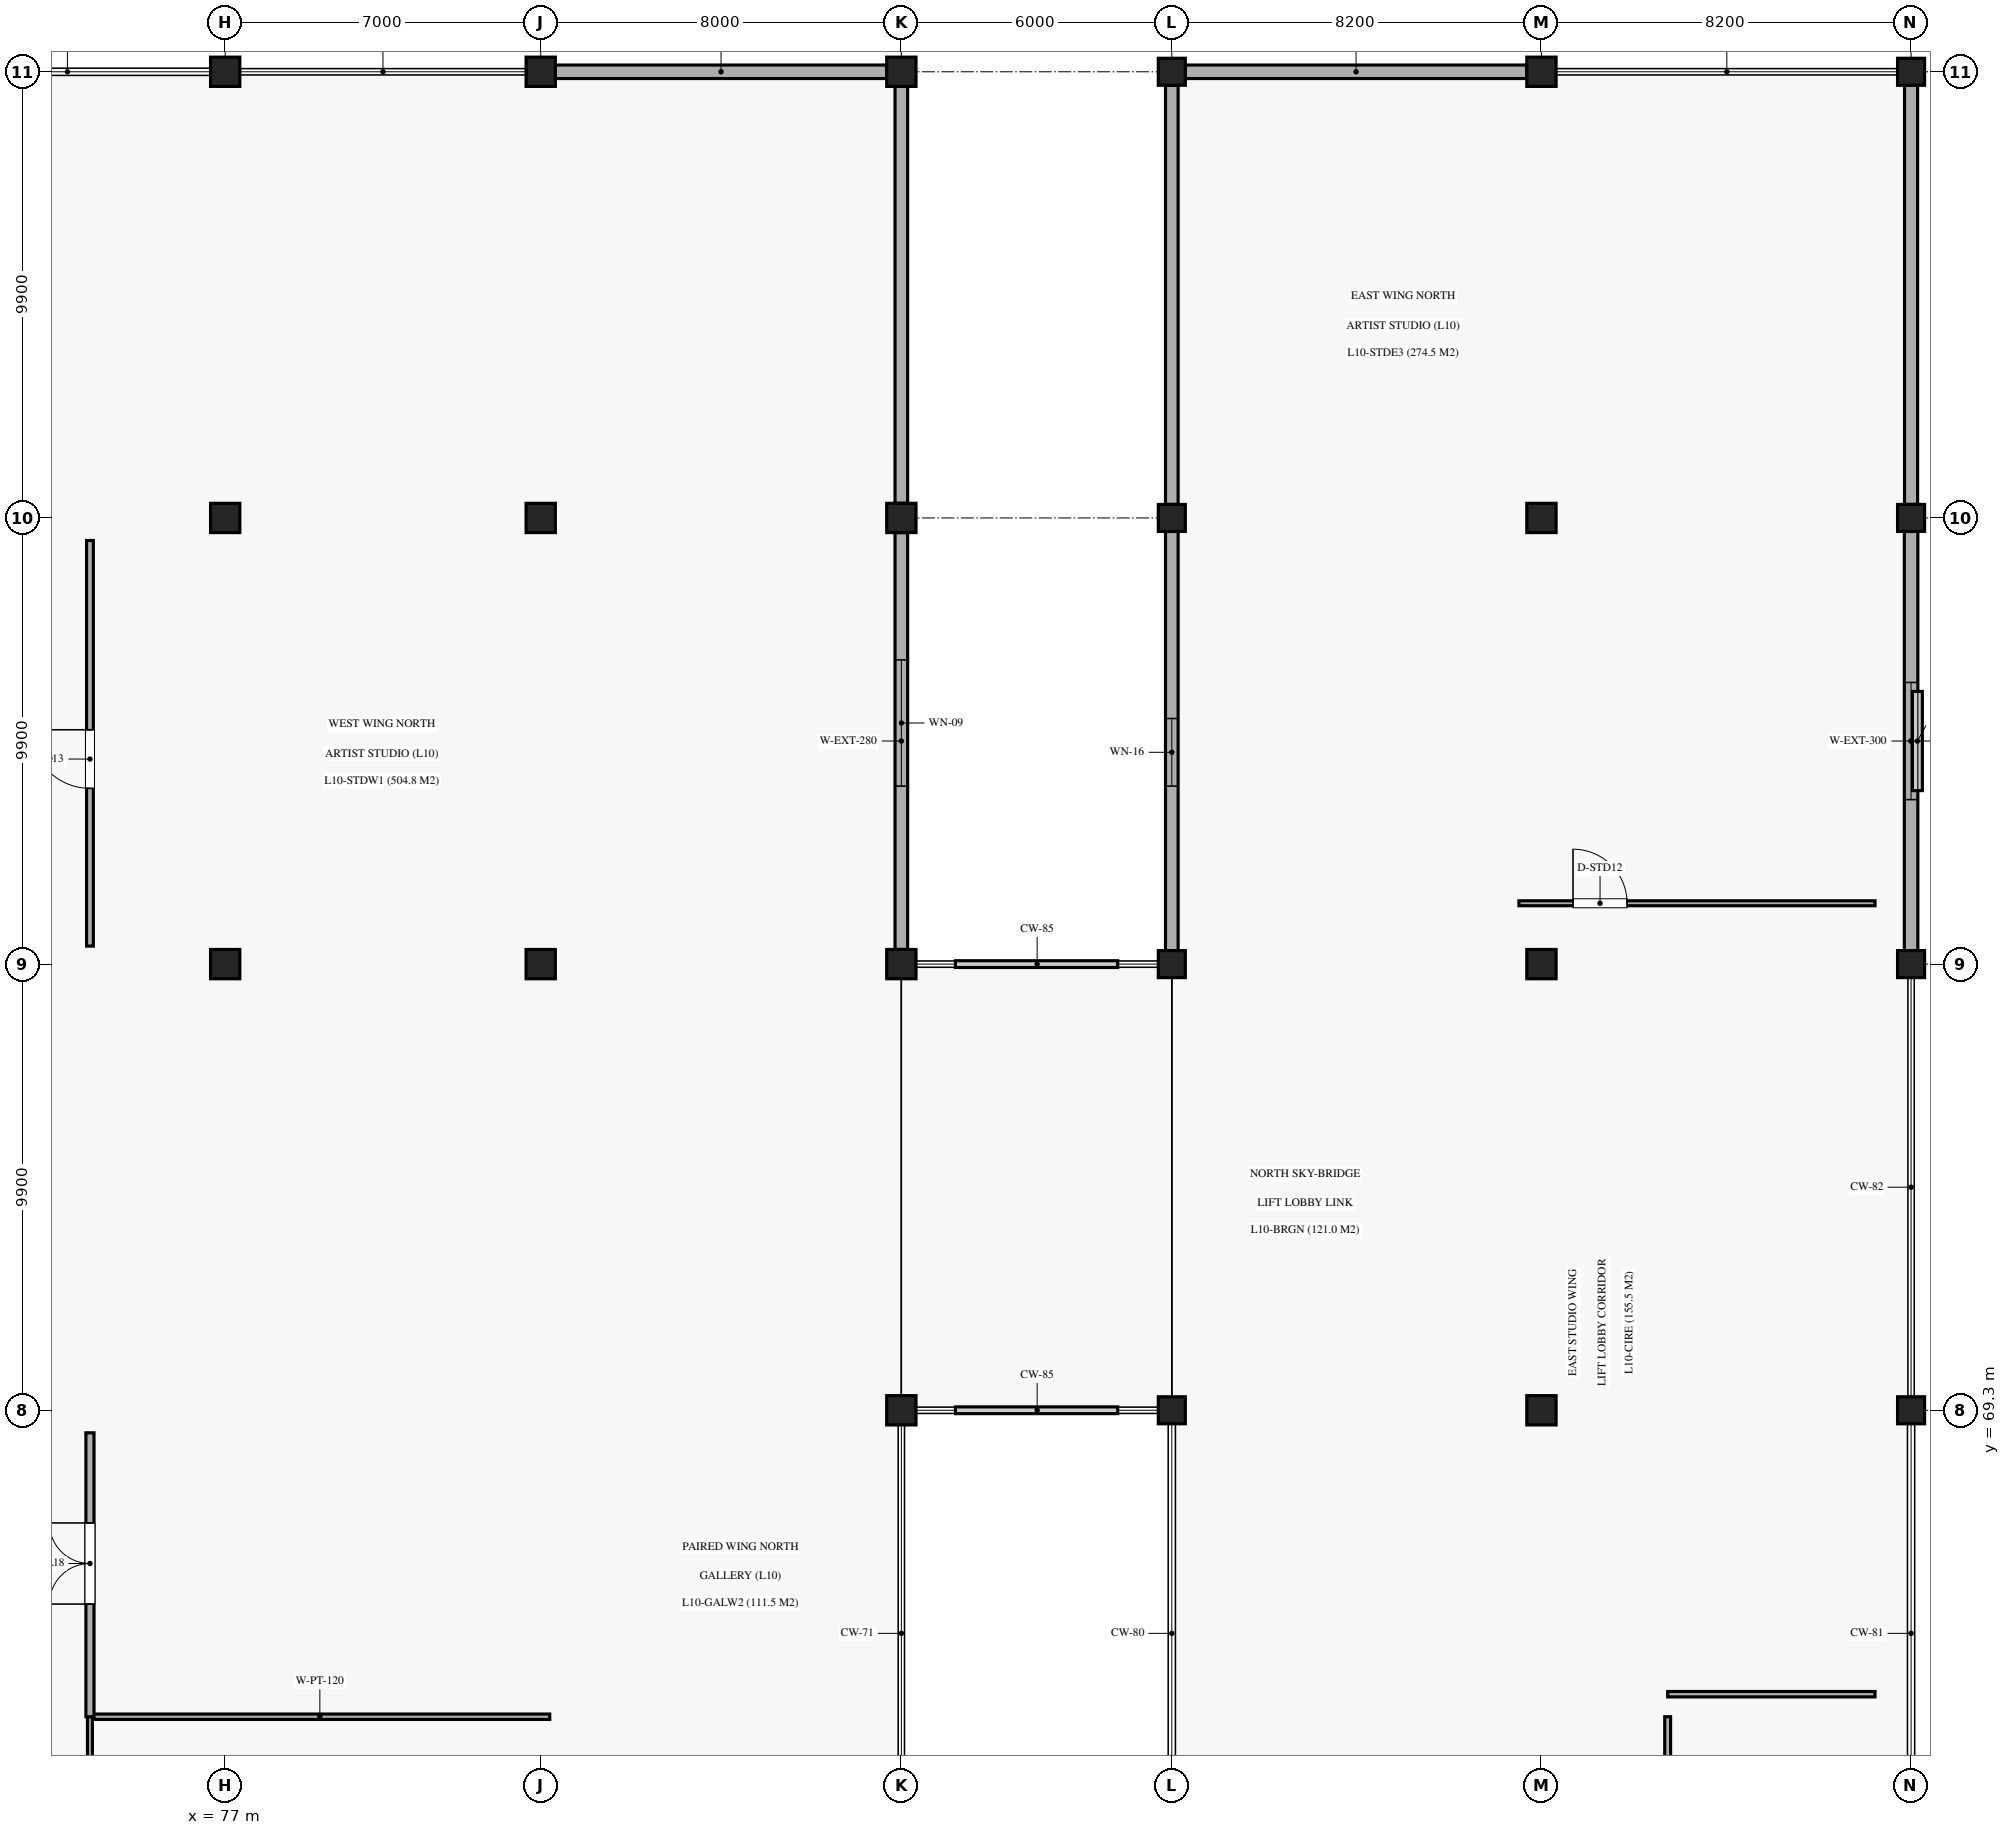
"""IFC4 building model, lengths in metres.
Left out: names, types, materials, properties, quantities, classifications, styles, units other than length and angle.
Written with IfcOpenShell. Run it as: python <this file> out.ifc"""

import sys

from ifc_helpers import new_model, si_unit, direction, frame, frame_2d, origin, origin_2d, place, context, subcontext, project, spatial, rectangle, extrude, element, fill, save


model = new_model("IFC4")
c1 = context("Model", 3, precision=1e-05, world=origin(), true_north=direction((0.0, 1.0)))
c2 = subcontext(c1, "Body", "Model", "MODEL_VIEW")
j1 = project(units=[si_unit("LENGTHUNIT", "METRE"), si_unit("PLANEANGLEUNIT", "RADIAN")], contexts=[c1])
p1 = place(None, origin())
s1 = spatial("IfcSite", under=j1, at=p1, CompositionType="ELEMENT")
p2 = place(p1, origin())
s2 = spatial("IfcBuilding", under=s1, at=p2, CompositionType="ELEMENT")
p3 = place(p2, frame((0.0, 0.0, 52.02)))
s3 = spatial("IfcBuildingStorey", under=s2, at=p3, CompositionType="ELEMENT", Elevation=52.02)
for number, where, z_axis, x_axis in (
    (1, (77.0, 79.2, 0.0), (0.0, 0.0, 1.0), (1.0, 0.0, 0.0)),
    (2, (77.0, 89.1, 0.0), (0.0, 0.0, 1.0), (1.0, 0.0, 0.0)),
    (3, (77.0, 99.0, 0.0), (0.0, 0.0, 1.0), (1.0, 0.0, 0.0)),
    (4, (84.0, 79.2, 0.0), (0.0, 0.0, 1.0), (1.0, 0.0, 0.0)),
    (5, (84.0, 89.1, 0.0), (0.0, 0.0, 1.0), (1.0, 0.0, 0.0)),
    (6, (84.0, 99.0, 0.0), (0.0, 0.0, 1.0), (1.0, 0.0, 0.0)),
    (7, (92.0, 69.3, 0.0), (0.0, 0.0, 1.0), (1.0, 0.0, 0.0)),
    (8, (92.0, 79.2, 0.0), (0.0, 0.0, 1.0), (1.0, 0.0, 0.0)),
    (9, (92.0, 89.1, 0.0), (0.0, 0.0, 1.0), (1.0, 0.0, 0.0)),
    (10, (92.0, 99.0, 0.0), (0.0, 0.0, 1.0), (1.0, 0.0, 0.0)),
):
    element("IfcColumn", number, at=place(p3, frame(where, z_axis=z_axis, x_axis=x_axis)), inside=s3, PredefinedType="COLUMN", context=c2, shape_type="SweptSolid", body=[
        extrude(rectangle(XDim=0.65, YDim=0.65, at=origin_2d()), origin(), (0.0, 0.0, 1.0), 5.1),
    ])
for number, where, z_axis, x_axis in (
    (11, (98.0, 69.3, 0.0), (0.0, 0.0, 1.0), (1.0, 0.0, 0.0)),
    (12, (98.0, 79.2, 0.0), (0.0, 0.0, 1.0), (1.0, 0.0, 0.0)),
    (13, (98.0, 89.1, 0.0), (0.0, 0.0, 1.0), (1.0, 0.0, 0.0)),
    (14, (98.0, 99.0, 0.0), (0.0, 0.0, 1.0), (1.0, 0.0, 0.0)),
):
    element("IfcColumn", number, at=place(p3, frame(where, z_axis=z_axis, x_axis=x_axis)), inside=s3, PredefinedType="COLUMN", context=c2, shape_type="SweptSolid", body=[
        extrude(rectangle(XDim=0.6, YDim=0.6, at=origin_2d()), origin(), (0.0, 0.0, 1.0), 5.1),
    ])
for number, where, z_axis, x_axis in (
    (15, (106.2, 69.3, 0.0), (0.0, 0.0, 1.0), (1.0, 0.0, 0.0)),
    (16, (106.2, 79.2, 0.0), (0.0, 0.0, 1.0), (1.0, 0.0, 0.0)),
    (17, (106.2, 89.1, 0.0), (0.0, 0.0, 1.0), (1.0, 0.0, 0.0)),
    (18, (106.2, 99.0, 0.0), (0.0, 0.0, 1.0), (1.0, 0.0, 0.0)),
):
    element("IfcColumn", number, at=place(p3, frame(where, z_axis=z_axis, x_axis=x_axis)), inside=s3, PredefinedType="COLUMN", context=c2, shape_type="SweptSolid", body=[
        extrude(rectangle(XDim=0.65, YDim=0.65, at=origin_2d()), origin(), (0.0, 0.0, 1.0), 5.1),
    ])
for number, where, z_axis, x_axis in (
    (19, (114.4, 69.3, 0.0), (0.0, 0.0, 1.0), (1.0, 0.0, 0.0)),
    (20, (114.4, 79.2, 0.0), (0.0, 0.0, 1.0), (1.0, 0.0, 0.0)),
    (21, (114.4, 89.1, 0.0), (0.0, 0.0, 1.0), (1.0, 0.0, 0.0)),
    (22, (114.4, 99.0, 0.0), (0.0, 0.0, 1.0), (1.0, 0.0, 0.0)),
):
    element("IfcColumn", number, at=place(p3, frame(where, z_axis=z_axis, x_axis=x_axis)), inside=s3, PredefinedType="COLUMN", context=c2, shape_type="SweptSolid", body=[
        extrude(rectangle(XDim=0.6, YDim=0.6, at=origin_2d()), origin(), (0.0, 0.0, 1.0), 5.1),
    ])
p4 = place(p3, frame((92.0, 79.525, 0.0), z_axis=(0.0, 0.0, 1.0), x_axis=(0.0, 1.0, 0.0)))
e23 = element("IfcWall", 23, at=p4, inside=s3, PredefinedType="SOLIDWALL", context=c2, shape_type="SweptSolid", body=[
    extrude(rectangle(XDim=9.25, YDim=0.28, at=frame_2d((4.625, 0.0))), origin(), (0.0, 0.0, 1.0), 4.1),
])
p5 = place(p4, frame((3.625, 0.0, 1.45)))
e24 = element("IfcOpeningElement", 24, at=p5, cuts=e23, PredefinedType="OPENING", context=c2, shape_type="SweptSolid", body=[
    extrude(rectangle(XDim=2.8, YDim=1.9, at=frame_2d((1.4, 0.95))), frame((0.0, 0.15, 0.0), z_axis=(0.0, -1.0, 0.0), x_axis=(1.0, 0.0, 0.0)), (0.0, 0.0, 1.0), 0.3),
])
p6 = place(p3, frame((92.0, 89.425, 0.0), z_axis=(0.0, 0.0, 1.0), x_axis=(0.0, 1.0, 0.0)))
e25 = element("IfcWall", 25, at=p6, inside=s3, PredefinedType="SOLIDWALL", context=c2, shape_type="SweptSolid", body=[
    extrude(rectangle(XDim=9.25, YDim=0.28, at=frame_2d((4.625, 0.0))), origin(), (0.0, 0.0, 1.0), 4.1),
])
p7 = place(p3, frame((84.325, 99.0, 0.0), z_axis=(0.0, 0.0, 1.0), x_axis=(1.0, 0.0, 0.0)))
e26 = element("IfcWall", 26, at=p7, inside=s3, PredefinedType="SOLIDWALL", context=c2, shape_type="SweptSolid", body=[
    extrude(rectangle(XDim=7.35, YDim=0.3, at=frame_2d((3.675, 0.0))), origin(), (0.0, 0.0, 1.0), 4.1),
])
p8 = place(p3, frame((98.0, 79.5, 0.0), z_axis=(0.0, 0.0, 1.0), x_axis=(0.0, 1.0, 0.0)))
e27 = element("IfcWall", 27, at=p8, inside=s3, PredefinedType="SOLIDWALL", context=c2, shape_type="SweptSolid", body=[
    extrude(rectangle(XDim=9.3, YDim=0.28, at=frame_2d((4.65, 0.0))), origin(), (0.0, 0.0, 1.0), 4.1),
])
p9 = place(p8, frame((3.65, 0.0, 1.45)))
e28 = element("IfcOpeningElement", 28, at=p9, cuts=e27, PredefinedType="OPENING", context=c2, shape_type="SweptSolid", body=[
    extrude(rectangle(XDim=1.5, YDim=1.35, at=frame_2d((0.75, 0.675))), frame((0.0, 0.15, 0.0), z_axis=(0.0, -1.0, 0.0), x_axis=(1.0, 0.0, 0.0)), (0.0, 0.0, 1.0), 0.3),
])
p10 = place(p3, frame((114.4, 79.5, 0.0), z_axis=(0.0, 0.0, 1.0), x_axis=(0.0, 1.0, 0.0)))
e29 = element("IfcWall", 29, at=p10, inside=s3, PredefinedType="SOLIDWALL", context=c2, shape_type="SweptSolid", body=[
    extrude(rectangle(XDim=9.3, YDim=0.3, at=frame_2d((4.65, 0.0))), origin(), (0.0, 0.0, 1.0), 4.1),
])
p11 = place(p10, frame((3.35, 0.0, 1.65)))
e30 = element("IfcOpeningElement", 30, at=p11, cuts=e29, PredefinedType="OPENING", context=c2, shape_type="SweptSolid", body=[
    extrude(rectangle(XDim=2.6, YDim=1.85, at=frame_2d((1.3, 0.925))), frame((0.0, 0.16, 0.0), z_axis=(0.0, -1.0, 0.0), x_axis=(1.0, 0.0, 0.0)), (0.0, 0.0, 1.0), 0.32),
])
p12 = place(p3, frame((98.0, 89.4, 0.0), z_axis=(0.0, 0.0, 1.0), x_axis=(0.0, 1.0, 0.0)))
e31 = element("IfcWall", 31, at=p12, inside=s3, PredefinedType="SOLIDWALL", context=c2, shape_type="SweptSolid", body=[
    extrude(rectangle(XDim=9.3, YDim=0.28, at=frame_2d((4.65, 0.0))), origin(), (0.0, 0.0, 1.0), 4.1),
])
p13 = place(p3, frame((114.4, 89.4, 0.0), z_axis=(0.0, 0.0, 1.0), x_axis=(0.0, 1.0, 0.0)))
e32 = element("IfcWall", 32, at=p13, inside=s3, PredefinedType="SOLIDWALL", context=c2, shape_type="SweptSolid", body=[
    extrude(rectangle(XDim=9.3, YDim=0.29, at=frame_2d((4.65, 0.0))), origin(), (0.0, 0.0, 1.0), 4.1),
])
p14 = place(p3, frame((98.3, 99.0, 0.0), z_axis=(0.0, 0.0, 1.0), x_axis=(1.0, 0.0, 0.0)))
e33 = element("IfcWall", 33, at=p14, inside=s3, PredefinedType="SOLIDWALL", context=c2, shape_type="SweptSolid", body=[
    extrude(rectangle(XDim=7.575, YDim=0.3, at=frame_2d((3.788, 0.0))), origin(), (0.0, 0.0, 1.0), 4.1),
])
p15 = place(p3, frame((74.0, 62.5, 0.0), z_axis=(0.0, 0.0, 1.0), x_axis=(1.0, 0.0, 0.0)))
e34 = element("IfcWall", 34, at=p15, inside=s3, PredefinedType="PARTITIONING", context=c2, shape_type="SweptSolid", body=[
    extrude(rectangle(XDim=10.2, YDim=0.12, at=frame_2d((5.1, 0.0))), origin(), (0.0, 0.0, 1.0), 3.97),
])
p16 = place(p3, frame((74.0, 40.2, 0.0), z_axis=(0.0, 0.0, 1.0), x_axis=(0.0, 1.0, 0.0)))
e35 = element("IfcWall", 35, at=p16, inside=s3, PredefinedType="PARTITIONING", context=c2, shape_type="SweptSolid", body=[
    extrude(rectangle(XDim=22.3, YDim=0.11, at=frame_2d((11.15, 0.0))), origin(), (0.0, 0.0, 1.0), 3.97),
])
p17 = place(p16, frame((3.2, 0.0, 0.0)))
e36 = element("IfcOpeningElement", 36, at=p17, cuts=e35, PredefinedType="OPENING", context=c2, shape_type="SweptSolid", body=[
    extrude(rectangle(XDim=1.8, YDim=2.45, at=frame_2d((0.9, 1.225))), frame((0.0, 0.065, 0.0), z_axis=(0.0, -1.0, 0.0), x_axis=(1.0, 0.0, 0.0)), (0.0, 0.0, 1.0), 0.13),
])
p18 = place(p3, frame((74.0, 62.5, 0.0), z_axis=(0.0, 0.0, 1.0), x_axis=(0.0, 1.0, 0.0)))
e37 = element("IfcWall", 37, at=p18, inside=s3, PredefinedType="PARTITIONING", context=c2, shape_type="SweptSolid", body=[
    extrude(rectangle(XDim=6.3, YDim=0.18, at=frame_2d((3.15, 0.0))), origin(), (0.0, 0.0, 1.0), 3.97),
])
p19 = place(p18, frame((2.5, 0.0, 0.0)))
e38 = element("IfcOpeningElement", 38, at=p19, cuts=e37, PredefinedType="OPENING", context=c2, shape_type="SweptSolid", body=[
    extrude(rectangle(XDim=1.8, YDim=2.45, at=frame_2d((0.9, 1.225))), frame((0.0, 0.1, 0.0), z_axis=(0.0, -1.0, 0.0), x_axis=(1.0, 0.0, 0.0)), (0.0, 0.0, 1.0), 0.2),
])
p20 = place(p3, frame((74.0, 79.6, 0.0), z_axis=(0.0, 0.0, 1.0), x_axis=(0.0, 1.0, 0.0)))
e39 = element("IfcWall", 39, at=p20, inside=s3, PredefinedType="PARTITIONING", context=c2, shape_type="SweptSolid", body=[
    extrude(rectangle(XDim=9.0, YDim=0.15, at=frame_2d((4.5, 0.0))), origin(), (0.0, 0.0, 1.0), 3.97),
])
p21 = place(p20, frame((3.5, 0.0, 0.0)))
e40 = element("IfcOpeningElement", 40, at=p21, cuts=e39, PredefinedType="OPENING", context=c2, shape_type="SweptSolid", body=[
    extrude(rectangle(XDim=1.3, YDim=2.25, at=frame_2d((0.65, 1.125))), frame((0.0, 0.085, 0.0), z_axis=(0.0, -1.0, 0.0), x_axis=(1.0, 0.0, 0.0)), (0.0, 0.0, 1.0), 0.17),
])
p22 = place(p3, frame((109.0, 35.5, 0.0), z_axis=(0.0, 0.0, 1.0), x_axis=(0.0, 1.0, 0.0)))
e41 = element("IfcWall", 41, at=p22, inside=s3, PredefinedType="PARTITIONING", context=c2, shape_type="SweptSolid", body=[
    extrude(rectangle(XDim=27.0, YDim=0.13, at=frame_2d((13.5, 0.0))), origin(), (0.0, 0.0, 1.0), 3.97),
])
p23 = place(p22, frame((8.0, 0.0, 0.0)))
e42 = element("IfcOpeningElement", 42, at=p23, cuts=e41, PredefinedType="OPENING", context=c2, shape_type="SweptSolid", body=[
    extrude(rectangle(XDim=1.2, YDim=2.25, at=frame_2d((0.6, 1.125))), frame((0.0, 0.075, 0.0), z_axis=(0.0, -1.0, 0.0), x_axis=(1.0, 0.0, 0.0)), (0.0, 0.0, 1.0), 0.15),
])
p24 = place(p3, frame((109.0, 63.0, 0.0), z_axis=(0.0, 0.0, 1.0), x_axis=(1.0, 0.0, 0.0)))
e43 = element("IfcWall", 43, at=p24, inside=s3, PredefinedType="PARTITIONING", context=c2, shape_type="SweptSolid", body=[
    extrude(rectangle(XDim=4.6, YDim=0.12, at=frame_2d((2.3, 0.0))), origin(), (0.0, 0.0, 1.0), 3.97),
])
p25 = place(p3, frame((105.7, 80.55, 0.0), z_axis=(0.0, 0.0, 1.0), x_axis=(1.0, 0.0, 0.0)))
e44 = element("IfcWall", 44, at=p25, inside=s3, PredefinedType="PARTITIONING", context=c2, shape_type="SweptSolid", body=[
    extrude(rectangle(XDim=7.9, YDim=0.11, at=frame_2d((3.95, 0.0))), origin(), (0.0, 0.0, 1.0), 3.97),
])
p26 = place(p25, frame((1.2, 0.0, 0.0)))
e45 = element("IfcOpeningElement", 45, at=p26, cuts=e44, PredefinedType="OPENING", context=c2, shape_type="SweptSolid", body=[
    extrude(rectangle(XDim=1.2, YDim=2.25, at=frame_2d((0.6, 1.125))), frame((0.0, 0.065, 0.0), z_axis=(0.0, -1.0, 0.0), x_axis=(1.0, 0.0, 0.0)), (0.0, 0.0, 1.0), 0.13),
])
p27 = place(p5, origin())
e46 = element("IfcWindow", 46, at=p27, inside=s3, PartitioningType="SINGLE_PANEL", PredefinedType="WINDOW", context=c2, shape_type="SweptSolid", body=[
    extrude(rectangle(XDim=2.8, YDim=1.9, at=frame_2d((1.4, 0.95))), frame((0.0, 0.03, 0.0), z_axis=(0.0, -1.0, 0.0), x_axis=(1.0, 0.0, 0.0)), (0.0, 0.0, 1.0), 0.06),
])
fill(e24, e46)
p28 = place(p9, origin())
e47 = element("IfcWindow", 47, at=p28, inside=s3, PartitioningType="SINGLE_PANEL", PredefinedType="WINDOW", context=c2, shape_type="SweptSolid", body=[
    extrude(rectangle(XDim=1.5, YDim=1.35, at=frame_2d((0.75, 0.675))), frame((0.0, 0.03, 0.0), z_axis=(0.0, -1.0, 0.0), x_axis=(1.0, 0.0, 0.0)), (0.0, 0.0, 1.0), 0.06),
])
fill(e28, e47)
p29 = place(p11, origin())
e48 = element("IfcWindow", 48, at=p29, inside=s3, PartitioningType="SINGLE_PANEL", PredefinedType="WINDOW", context=c2, shape_type="SweptSolid", body=[
    extrude(rectangle(XDim=2.6, YDim=1.85, at=frame_2d((1.3, 0.925))), frame((0.0, 0.03, 0.0), z_axis=(0.0, -1.0, 0.0), x_axis=(1.0, 0.0, 0.0)), (0.0, 0.0, 1.0), 0.06),
])
fill(e30, e48)
p30 = place(p19, origin())
e49 = element("IfcDoor", 49, at=p30, inside=s3, OperationType="DOUBLE_DOOR_SINGLE_SWING", PredefinedType="DOOR", context=c2, shape_type="SweptSolid", body=[
    extrude(rectangle(XDim=1.8, YDim=2.45, at=frame_2d((0.9, 1.225))), frame((0.0, 0.025, 0.0), z_axis=(0.0, -1.0, 0.0), x_axis=(1.0, 0.0, 0.0)), (0.0, 0.0, 1.0), 0.05),
])
fill(e38, e49)
p31 = place(p21, origin())
e50 = element("IfcDoor", 50, at=p31, inside=s3, OperationType="SINGLE_SWING_RIGHT", PredefinedType="DOOR", context=c2, shape_type="SweptSolid", body=[
    extrude(rectangle(XDim=1.3, YDim=2.25, at=frame_2d((0.65, 1.125))), frame((0.0, 0.025, 0.0), z_axis=(0.0, -1.0, 0.0), x_axis=(1.0, 0.0, 0.0)), (0.0, 0.0, 1.0), 0.05),
])
fill(e40, e50)
p32 = place(p26, origin())
e51 = element("IfcDoor", 51, at=p32, inside=s3, OperationType="SINGLE_SWING_LEFT", PredefinedType="DOOR", context=c2, shape_type="SweptSolid", body=[
    extrude(rectangle(XDim=1.2, YDim=2.25, at=frame_2d((0.6, 1.125))), frame((0.0, 0.025, 0.0), z_axis=(0.0, -1.0, 0.0), x_axis=(1.0, 0.0, 0.0)), (0.0, 0.0, 1.0), 0.05),
])
fill(e45, e51)
save(model, sys.argv[1])
